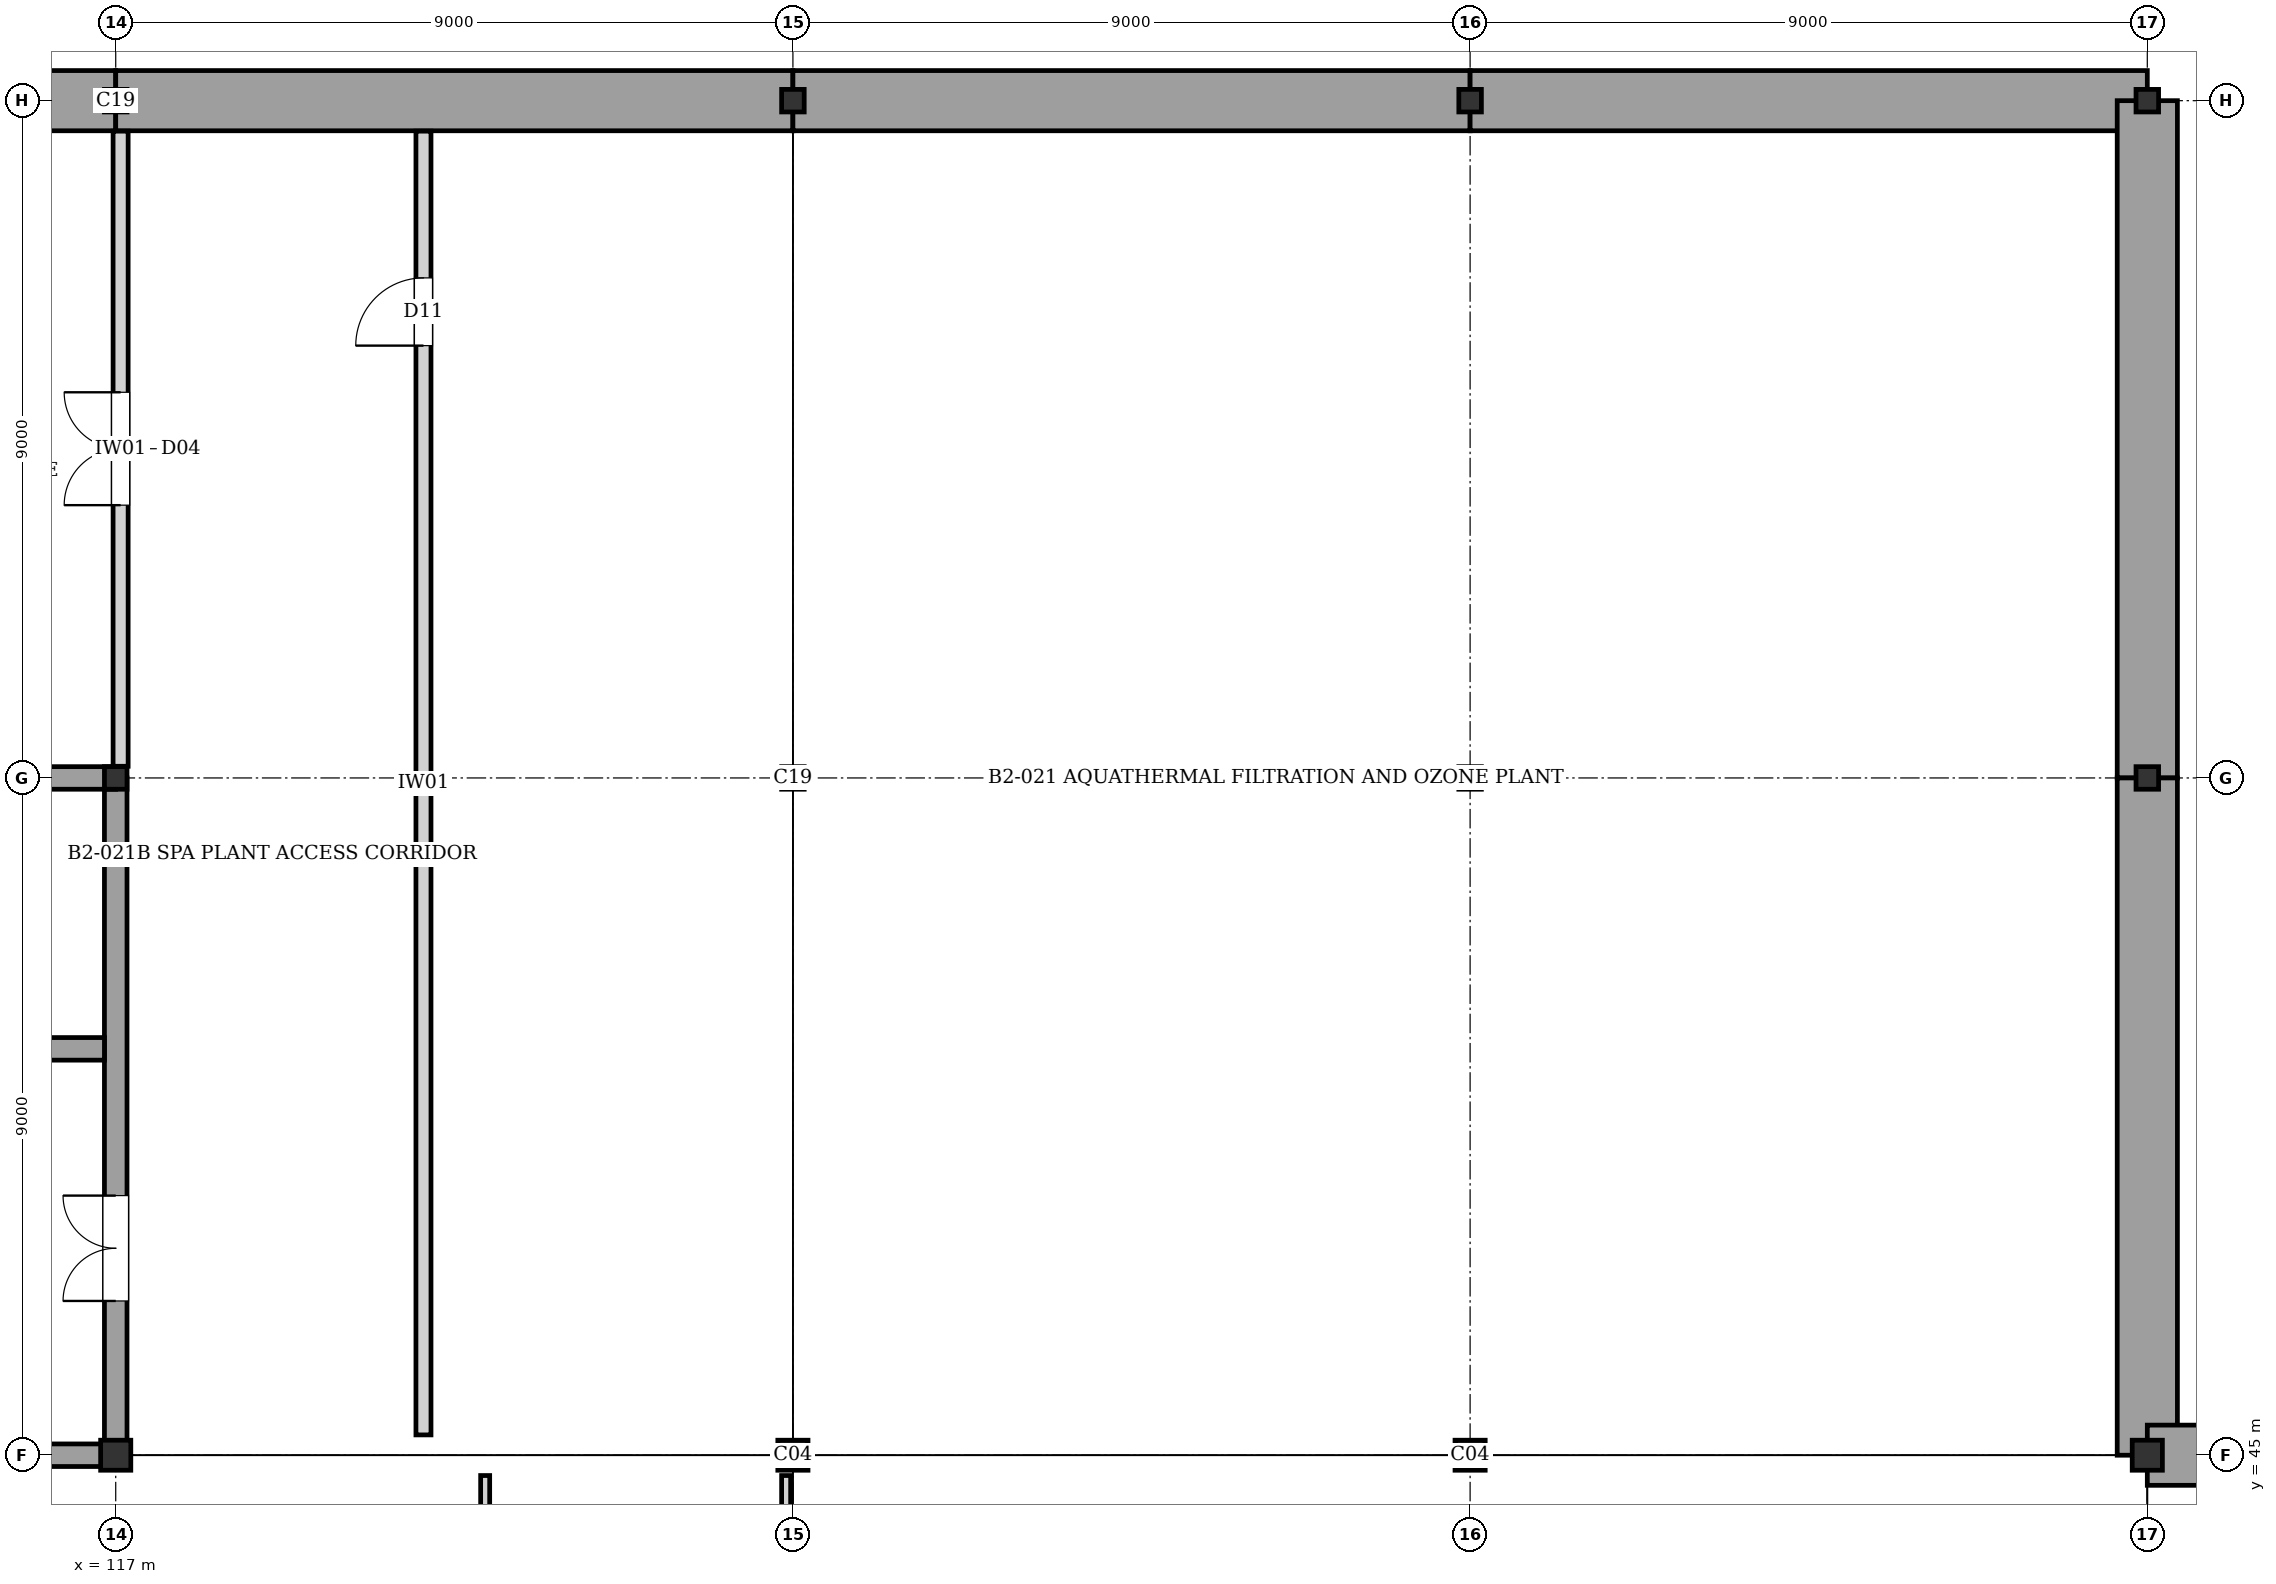
"""IFC4 building model, lengths in metres.
Left out: names, types, materials, properties, quantities, classifications, styles, units other than length and angle.
Written with IfcOpenShell. Run it as: python <this file> out.ifc"""

import sys

from ifc_helpers import new_model, si_unit, direction, frame, frame_2d, origin, origin_2d, place, context, subcontext, project, spatial, rectangle, hollow_rectangle, i_section, extrude, element, fill, save


model = new_model("IFC4")
c1 = context("Model", 3, precision=1e-05, world=origin(), true_north=direction((0.0, 1.0)))
c2 = subcontext(c1, "Body", "Model", "MODEL_VIEW")
j1 = project(units=[si_unit("LENGTHUNIT", "METRE"), si_unit("PLANEANGLEUNIT", "RADIAN")], contexts=[c1])
p1 = place(None, origin())
s1 = spatial("IfcSite", under=j1, at=p1, CompositionType="ELEMENT")
p2 = place(p1, origin())
s2 = spatial("IfcBuilding", under=s1, at=p2, CompositionType="ELEMENT")
p3 = place(p2, frame((0.0, 0.0, -8.96)))
s3 = spatial("IfcBuildingStorey", under=s2, at=p3, CompositionType="ELEMENT", Elevation=-8.96)
p4 = place(p3, frame((117.0, 45.0, 0.0), z_axis=(0.0, 0.0, 1.0), x_axis=(1.0, 0.0, 0.0)))
e1 = element("IfcColumn", 1, at=p4, inside=s3, PredefinedType="COLUMN", context=c2, shape_type="SweptSolid", body=[
    extrude(i_section(OverallWidth=0.401, OverallDepth=0.399, WebThickness=0.019, FlangeThickness=0.03, at=origin_2d()), origin(), (0.0, 0.0, 1.0), 4.48),
])
for number, where, z_axis, x_axis in (
    (2, (117.0, 54.0, 0.0), (0.0, 0.0, 1.0), (1.0, 0.0, 0.0)),
    (3, (117.0, 63.0, 0.0), (0.0, 0.0, 1.0), (1.0, 0.0, 0.0)),
):
    element("IfcColumn", number, at=place(p3, frame(where, z_axis=z_axis, x_axis=x_axis)), inside=s3, PredefinedType="COLUMN", context=c2, shape_type="SweptSolid", body=[
        extrude(hollow_rectangle(XDim=0.3, YDim=0.3, WallThickness=0.012, at=origin_2d()), origin(), (0.0, 0.0, 1.0), 4.48),
    ])
p5 = place(p3, frame((126.0, 45.0, 0.0), z_axis=(0.0, 0.0, 1.0), x_axis=(1.0, 0.0, 0.0)))
e4 = element("IfcColumn", 4, at=p5, inside=s3, PredefinedType="COLUMN", context=c2, shape_type="SweptSolid", body=[
    extrude(i_section(OverallWidth=0.401, OverallDepth=0.399, WebThickness=0.019, FlangeThickness=0.03, at=origin_2d()), origin(), (0.0, 0.0, 1.0), 4.48),
])
for number, where, z_axis, x_axis in (
    (5, (126.0, 54.0, 0.0), (0.0, 0.0, 1.0), (1.0, 0.0, 0.0)),
    (6, (126.0, 63.0, 0.0), (0.0, 0.0, 1.0), (1.0, 0.0, 0.0)),
):
    element("IfcColumn", number, at=place(p3, frame(where, z_axis=z_axis, x_axis=x_axis)), inside=s3, PredefinedType="COLUMN", context=c2, shape_type="SweptSolid", body=[
        extrude(hollow_rectangle(XDim=0.3, YDim=0.3, WallThickness=0.012, at=origin_2d()), origin(), (0.0, 0.0, 1.0), 4.48),
    ])
p6 = place(p3, frame((135.0, 45.0, 0.0), z_axis=(0.0, 0.0, 1.0), x_axis=(1.0, 0.0, 0.0)))
e7 = element("IfcColumn", 7, at=p6, inside=s3, PredefinedType="COLUMN", context=c2, shape_type="SweptSolid", body=[
    extrude(i_section(OverallWidth=0.401, OverallDepth=0.399, WebThickness=0.019, FlangeThickness=0.03, at=origin_2d()), origin(), (0.0, 0.0, 1.0), 4.48),
])
for number, where, z_axis, x_axis in (
    (8, (135.0, 54.0, 0.0), (0.0, 0.0, 1.0), (1.0, 0.0, 0.0)),
    (9, (135.0, 63.0, 0.0), (0.0, 0.0, 1.0), (1.0, 0.0, 0.0)),
):
    element("IfcColumn", number, at=place(p3, frame(where, z_axis=z_axis, x_axis=x_axis)), inside=s3, PredefinedType="COLUMN", context=c2, shape_type="SweptSolid", body=[
        extrude(hollow_rectangle(XDim=0.3, YDim=0.3, WallThickness=0.012, at=origin_2d()), origin(), (0.0, 0.0, 1.0), 4.48),
    ])
p7 = place(p3, frame((144.0, 45.0, 0.0), z_axis=(0.0, 0.0, 1.0), x_axis=(1.0, 0.0, 0.0)))
e10 = element("IfcColumn", 10, at=p7, inside=s3, PredefinedType="COLUMN", context=c2, shape_type="SweptSolid", body=[
    extrude(i_section(OverallWidth=0.401, OverallDepth=0.399, WebThickness=0.019, FlangeThickness=0.03, at=origin_2d()), origin(), (0.0, 0.0, 1.0), 4.48),
])
for number, where, z_axis, x_axis in (
    (11, (144.0, 54.0, 0.0), (0.0, 0.0, 1.0), (1.0, 0.0, 0.0)),
    (12, (144.0, 63.0, 0.0), (0.0, 0.0, 1.0), (1.0, 0.0, 0.0)),
):
    element("IfcColumn", number, at=place(p3, frame(where, z_axis=z_axis, x_axis=x_axis)), inside=s3, PredefinedType="COLUMN", context=c2, shape_type="SweptSolid", body=[
        extrude(hollow_rectangle(XDim=0.3, YDim=0.3, WallThickness=0.012, at=origin_2d()), origin(), (0.0, 0.0, 1.0), 4.48),
    ])
for number, where, z_axis, x_axis in (
    (13, (108.0, 63.0, 0.0), (0.0, 0.0, 1.0), (1.0, 0.0, 0.0)),
    (14, (117.0, 63.0, 0.0), (0.0, 0.0, 1.0), (1.0, 0.0, 0.0)),
    (15, (126.0, 63.0, 0.0), (0.0, 0.0, 1.0), (1.0, 0.0, 0.0)),
    (16, (135.0, 63.0, 0.0), (0.0, 0.0, 1.0), (1.0, 0.0, 0.0)),
    (17, (144.0, 63.0, 0.0), (0.0, 0.0, 1.0), (0.0, -1.0, 0.0)),
    (18, (144.0, 54.0, 0.0), (0.0, 0.0, 1.0), (0.0, -1.0, 0.0)),
):
    element("IfcWall", number, at=place(p3, frame(where, z_axis=z_axis, x_axis=x_axis)), inside=s3, PredefinedType="USERDEFINED", context=c2, shape_type="SweptSolid", body=[
        extrude(rectangle(XDim=9.0, YDim=0.8, at=frame_2d((4.5, 0.0))), origin(), (0.0, 0.0, 1.0), 4.03),
    ])
p8 = place(p3, frame((144.0, 45.0, 0.0), z_axis=(0.0, 0.0, 1.0), x_axis=(1.0, 0.0, 0.0)))
e19 = element("IfcWall", 19, at=p8, inside=s3, PredefinedType="USERDEFINED", context=c2, shape_type="SweptSolid", body=[
    extrude(rectangle(XDim=9.0, YDim=0.8, at=frame_2d((4.5, 0.0))), origin(), (0.0, 0.0, 1.0), 4.08),
])
p9 = place(p3, frame((108.0, 45.0, 0.0), z_axis=(0.0, 0.0, 1.0), x_axis=(1.0, 0.0, 0.0)))
e20 = element("IfcWall", 20, at=p9, inside=s3, PredefinedType="SHEAR", context=c2, shape_type="SweptSolid", body=[
    extrude(rectangle(XDim=9.0, YDim=0.3, at=frame_2d((4.5, 0.0))), origin(), (0.0, 0.0, 1.0), 4.03),
])
p10 = place(p3, frame((117.0, 45.0, 0.0), z_axis=(0.0, 0.0, 1.0), x_axis=(0.0, 1.0, 0.0)))
e21 = element("IfcWall", 21, at=p10, inside=s3, PredefinedType="SHEAR", context=c2, shape_type="SweptSolid", body=[
    extrude(rectangle(XDim=9.0, YDim=0.3, at=frame_2d((4.5, 0.0))), origin(), (0.0, 0.0, 1.0), 4.03),
])
p11 = place(p10, frame((2.05, 0.0, 0.0)))
e22 = element("IfcOpeningElement", 22, at=p11, cuts=e21, PredefinedType="OPENING", context=c2, shape_type="SweptSolid", body=[
    extrude(rectangle(XDim=1.4, YDim=2.02, at=frame_2d((0.7, 1.01))), frame((0.0, 0.16, 0.0), z_axis=(0.0, -1.0, 0.0), x_axis=(1.0, 0.0, 0.0)), (0.0, 0.0, 1.0), 0.32),
])
p12 = place(p3, frame((108.0, 54.0, 0.0), z_axis=(0.0, 0.0, 1.0), x_axis=(1.0, 0.0, 0.0)))
e23 = element("IfcWall", 23, at=p12, inside=s3, PredefinedType="SHEAR", context=c2, shape_type="SweptSolid", body=[
    extrude(rectangle(XDim=9.0, YDim=0.3, at=frame_2d((4.5, 0.0))), origin(), (0.0, 0.0, 1.0), 4.03),
])
p13 = place(p3, frame((112.65, 50.4, 0.0), z_axis=(0.0, 0.0, 1.0), x_axis=(1.0, 0.0, 0.0)))
e24 = element("IfcWall", 24, at=p13, inside=s3, PredefinedType="SHEAR", context=c2, shape_type="SweptSolid", body=[
    extrude(rectangle(XDim=4.2, YDim=0.3, at=frame_2d((2.1, 0.0))), origin(), (0.0, 0.0, 1.0), 4.03),
])
p14 = place(p13, frame((1.5, 0.0, 0.0)))
e25 = element("IfcOpeningElement", 25, at=p14, cuts=e24, PredefinedType="OPENING", context=c2, shape_type="SweptSolid", body=[
    extrude(rectangle(XDim=1.2, YDim=2.2, at=frame_2d((0.6, 1.1))), frame((0.0, 0.16, 0.0), z_axis=(0.0, -1.0, 0.0), x_axis=(1.0, 0.0, 0.0)), (0.0, 0.0, 1.0), 0.32),
])
p15 = place(p3, frame((117.065, 54.155, 0.0), z_axis=(0.0, 0.0, 1.0), x_axis=(0.0, 1.0, 0.0)))
e26 = element("IfcWall", 26, at=p15, inside=s3, PredefinedType="PARTITIONING", context=c2, shape_type="SweptSolid", body=[
    extrude(rectangle(XDim=8.44, YDim=0.2, at=frame_2d((4.22, 0.0))), origin(), (0.0, 0.0, 1.0), 3.13),
])
p16 = place(p15, frame((3.47, 0.0, 0.0)))
e27 = element("IfcOpeningElement", 27, at=p16, cuts=e26, PredefinedType="OPENING", context=c2, shape_type="SweptSolid", body=[
    extrude(rectangle(XDim=1.5, YDim=2.1, at=frame_2d((0.75, 1.05))), frame((0.0, 0.11, 0.0), z_axis=(0.0, -1.0, 0.0), x_axis=(1.0, 0.0, 0.0)), (0.0, 0.0, 1.0), 0.22),
])
p17 = place(p3, frame((121.09, 45.27, 0.0), z_axis=(0.0, 0.0, 1.0), x_axis=(0.0, 1.0, 0.0)))
e28 = element("IfcWall", 28, at=p17, inside=s3, PredefinedType="PARTITIONING", context=c2, shape_type="SweptSolid", body=[
    extrude(rectangle(XDim=17.325, YDim=0.2, at=frame_2d((8.663, 0.0))), origin(), (0.0, 0.0, 1.0), 4.03),
])
p18 = place(p17, frame((14.475, 0.0, 0.0)))
e29 = element("IfcOpeningElement", 29, at=p18, cuts=e28, PredefinedType="OPENING", context=c2, shape_type="SweptSolid", body=[
    extrude(rectangle(XDim=0.9, YDim=2.2, at=frame_2d((0.45, 1.1))), frame((0.0, 0.11, 0.0), z_axis=(0.0, -1.0, 0.0), x_axis=(1.0, 0.0, 0.0)), (0.0, 0.0, 1.0), 0.22),
])
p19 = place(p3, frame((121.91, 18.22, 0.0), z_axis=(0.0, 0.0, 1.0), x_axis=(0.0, 1.0, 0.0)))
e30 = element("IfcWall", 30, at=p19, inside=s3, PredefinedType="PARTITIONING", context=c2, shape_type="SweptSolid", body=[
    extrude(rectangle(XDim=26.51, YDim=0.12, at=frame_2d((13.255, 0.0))), origin(), (0.0, 0.0, 1.0), 4.08),
])
p20 = place(p19, frame((12.755, 0.0, 0.0)))
e31 = element("IfcOpeningElement", 31, at=p20, cuts=e30, PredefinedType="OPENING", context=c2, shape_type="SweptSolid", body=[
    extrude(rectangle(XDim=1.0, YDim=2.1, at=frame_2d((0.5, 1.05))), frame((0.0, 0.07, 0.0), z_axis=(0.0, -1.0, 0.0), x_axis=(1.0, 0.0, 0.0)), (0.0, 0.0, 1.0), 0.14),
])
p21 = place(p3, frame((125.91, 36.405, 0.0), z_axis=(0.0, 0.0, 1.0), x_axis=(0.0, 1.0, 0.0)))
e32 = element("IfcWall", 32, at=p21, inside=s3, PredefinedType="PARTITIONING", context=c2, shape_type="SweptSolid", body=[
    extrude(rectangle(XDim=8.325, YDim=0.12, at=frame_2d((4.163, 0.0))), origin(), (0.0, 0.0, 1.0), 3.18),
])
p22 = place(p21, frame((3.663, 0.0, 0.0)))
e33 = element("IfcOpeningElement", 33, at=p22, cuts=e32, PredefinedType="OPENING", context=c2, shape_type="SweptSolid", body=[
    extrude(rectangle(XDim=1.0, YDim=2.1, at=frame_2d((0.5, 1.05))), frame((0.0, 0.07, 0.0), z_axis=(0.0, -1.0, 0.0), x_axis=(1.0, 0.0, 0.0)), (0.0, 0.0, 1.0), 0.14),
])
p23 = place(p11, origin())
e34 = element("IfcDoor", 34, at=p23, inside=s3, OperationType="DOUBLE_DOOR_SINGLE_SWING", PredefinedType="DOOR", context=c2, shape_type="SweptSolid", body=[
    extrude(rectangle(XDim=1.4, YDim=2.02, at=frame_2d((0.7, 1.01))), frame((0.0, 0.025, 0.0), z_axis=(0.0, -1.0, 0.0), x_axis=(1.0, 0.0, 0.0)), (0.0, 0.0, 1.0), 0.05),
])
fill(e22, e34)
p24 = place(p16, origin())
e35 = element("IfcDoor", 35, at=p24, inside=s3, OperationType="DOUBLE_DOOR_SINGLE_SWING", PredefinedType="DOOR", context=c2, shape_type="SweptSolid", body=[
    extrude(rectangle(XDim=1.5, YDim=2.1, at=frame_2d((0.75, 1.05))), frame((0.0, 0.025, 0.0), z_axis=(0.0, -1.0, 0.0), x_axis=(1.0, 0.0, 0.0)), (0.0, 0.0, 1.0), 0.05),
])
fill(e27, e35)
p25 = place(p18, origin())
e36 = element("IfcDoor", 36, at=p25, inside=s3, OperationType="SINGLE_SWING_LEFT", PredefinedType="DOOR", context=c2, shape_type="SweptSolid", body=[
    extrude(rectangle(XDim=0.9, YDim=2.2, at=frame_2d((0.45, 1.1))), frame((0.0, 0.025, 0.0), z_axis=(0.0, -1.0, 0.0), x_axis=(1.0, 0.0, 0.0)), (0.0, 0.0, 1.0), 0.05),
])
fill(e29, e36)
save(model, sys.argv[1])
